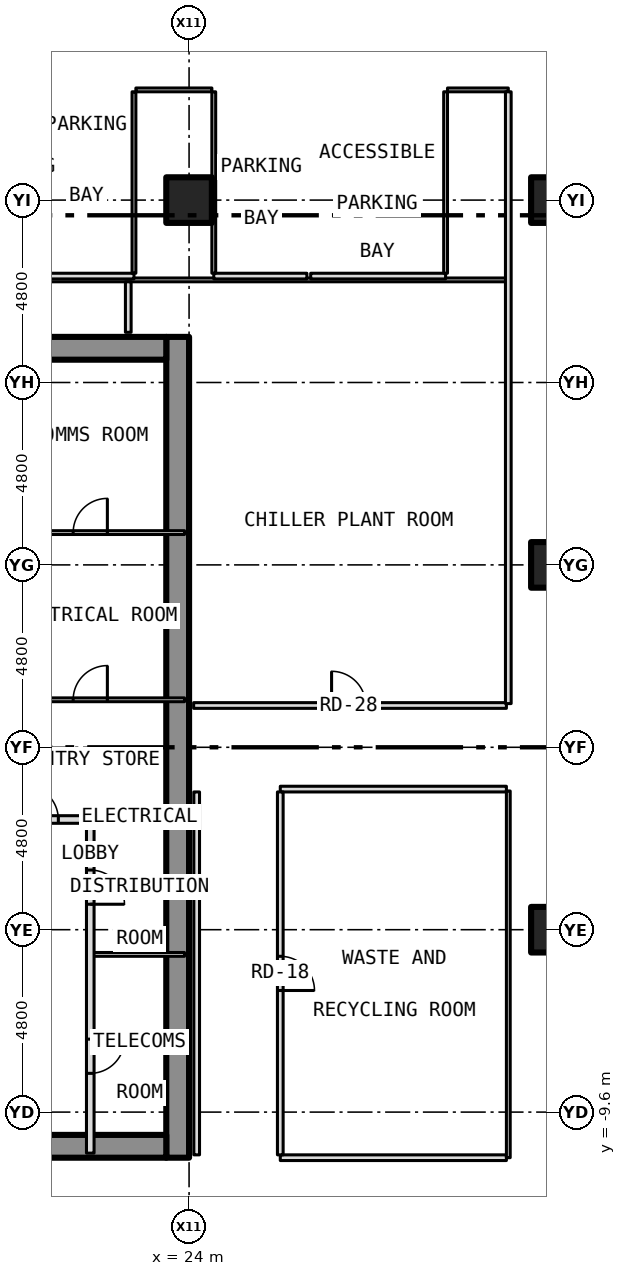
"""IFC4 building model, lengths in metres.
Left out: names, types, materials, properties, quantities, classifications, styles, units other than length and angle.
Written with IfcOpenShell. Run it as: python <this file> out.ifc"""

import sys

from ifc_helpers import new_model, si_unit, direction, frame, frame_2d, origin, origin_2d, place, context, subcontext, project, spatial, rectangle, hollow_rectangle, extrude, element, fill, save


model = new_model("IFC4")
c1 = context("Model", 3, precision=1e-05, world=origin(), true_north=direction((0.0, 1.0)))
c2 = subcontext(c1, "Body", "Model", "MODEL_VIEW")
j1 = project(units=[si_unit("LENGTHUNIT", "METRE"), si_unit("PLANEANGLEUNIT", "RADIAN")], contexts=[c1])
p1 = place(None, origin())
s1 = spatial("IfcSite", under=j1, at=p1, CompositionType="ELEMENT")
p2 = place(p1, origin())
s2 = spatial("IfcBuilding", under=s1, at=p2, CompositionType="ELEMENT")
p3 = place(p2, frame((0.0, 0.0, -10.0)))
s3 = spatial("IfcBuildingStorey", under=s2, at=p3, CompositionType="ELEMENT", Elevation=-10.0)
for number, where, z_axis, x_axis in (
    (1, (33.6, -4.8, -0.6), (0.0, 0.0, 1.0), (1.0, 0.0, 0.0)),
    (2, (33.6, 4.8, -0.6), (0.0, 0.0, 1.0), (1.0, 0.0, 0.0)),
    (3, (33.6, 14.4, -0.6), (0.0, 0.0, 1.0), (1.0, 0.0, 0.0)),
    (4, (24.0, 14.4, -0.6), (0.0, 0.0, 1.0), (1.0, 0.0, 0.0)),
):
    element("IfcColumn", number, at=place(p3, frame(where, z_axis=z_axis, x_axis=x_axis)), inside=s3, PredefinedType="COLUMN", context=c2, shape_type="SweptSolid", body=[
        extrude(hollow_rectangle(XDim=1.2, YDim=1.2, WallThickness=0.07, at=origin_2d()), origin(), (0.0, 0.0, 1.0), 5.3),
    ])
p4 = place(p3, frame((23.7, -10.8, 0.0), z_axis=(0.0, 0.0, 1.0), x_axis=(0.0, 1.0, 0.0)))
e5 = element("IfcWall", 5, at=p4, inside=s3, PredefinedType="SHEAR", context=c2, shape_type="SweptSolid", body=[
    extrude(rectangle(XDim=21.6, YDim=0.6, at=frame_2d((10.8, 0.0))), origin(), (0.0, 0.0, 1.0), 4.7),
])
for number, where, z_axis, x_axis in (
    (6, (16.4, 10.5, 0.0), (0.0, 0.0, 1.0), (1.0, 0.0, 0.0)),
    (7, (16.4, -10.5, 0.0), (0.0, 0.0, 1.0), (1.0, 0.0, 0.0)),
):
    element("IfcWall", number, at=place(p3, frame(where, z_axis=z_axis, x_axis=x_axis)), inside=s3, PredefinedType="SHEAR", context=c2, shape_type="SweptSolid", body=[
        extrude(rectangle(XDim=7.0, YDim=0.6, at=frame_2d((3.5, 0.0))), origin(), (0.0, 0.0, 1.0), 4.7),
    ])
p5 = place(p3, frame((26.4, -10.8, 0.0), z_axis=(0.0, 0.0, 1.0), x_axis=(1.0, 0.0, 0.0)))
e8 = element("IfcWall", 8, at=p5, inside=s3, PredefinedType="PARTITIONING", context=c2, shape_type="SweptSolid", body=[
    extrude(rectangle(XDim=5.95, YDim=0.15, at=frame_2d((2.975, 0.0))), origin(), (0.0, 0.0, 1.0), 4.7),
])
p6 = place(p3, frame((21.4, -5.45, 0.0), z_axis=(0.0, 0.0, 1.0), x_axis=(1.0, 0.0, 0.0)))
e9 = element("IfcWall", 9, at=p6, inside=s3, PredefinedType="PARTITIONING", context=c2, shape_type="SweptSolid", body=[
    extrude(rectangle(XDim=2.48, YDim=0.1, at=frame_2d((1.24, 0.0))), origin(), (0.0, 0.0, 1.0), 4.7),
])
p7 = place(p3, frame((15.92, -1.9, 0.0), z_axis=(0.0, 0.0, 1.0), x_axis=(1.0, 0.0, 0.0)))
e10 = element("IfcWall", 10, at=p7, inside=s3, PredefinedType="PARTITIONING", context=c2, shape_type="SweptSolid", body=[
    extrude(rectangle(XDim=7.96, YDim=0.2, at=frame_2d((3.98, 0.0))), origin(), (0.0, 0.0, 1.0), 4.7),
])
p8 = place(p7, frame((3.74, 0.0, 0.0)))
e11 = element("IfcOpeningElement", 11, at=p8, cuts=e10, PredefinedType="OPENING", context=c2, shape_type="SweptSolid", body=[
    extrude(rectangle(XDim=0.9, YDim=2.1, at=frame_2d((0.45, 1.05))), frame((0.0, 0.112, 0.0), z_axis=(0.0, -1.0, 0.0), x_axis=(1.0, 0.0, 0.0)), (0.0, 0.0, 1.0), 0.224),
])
p9 = place(p3, frame((26.4, -1.1, 0.0), z_axis=(0.0, 0.0, 1.0), x_axis=(1.0, 0.0, 0.0)))
e12 = element("IfcWall", 12, at=p9, inside=s3, PredefinedType="PARTITIONING", context=c2, shape_type="SweptSolid", body=[
    extrude(rectangle(XDim=5.95, YDim=0.15, at=frame_2d((2.975, 0.0))), origin(), (0.0, 0.0, 1.0), 4.7),
])
p10 = place(p3, frame((24.12, 1.1, 0.0), z_axis=(0.0, 0.0, 1.0), x_axis=(1.0, 0.0, 0.0)))
e13 = element("IfcWall", 13, at=p10, inside=s3, PredefinedType="PARTITIONING", context=c2, shape_type="SweptSolid", body=[
    extrude(rectangle(XDim=8.23, YDim=0.15, at=frame_2d((4.115, 0.0))), origin(), (0.0, 0.0, 1.0), 4.7),
])
p11 = place(p10, frame((3.63, 0.0, 0.0)))
e14 = element("IfcOpeningElement", 14, at=p11, cuts=e13, PredefinedType="OPENING", context=c2, shape_type="SweptSolid", body=[
    extrude(rectangle(XDim=0.9, YDim=2.1, at=frame_2d((0.45, 1.05))), frame((0.0, 0.087, 0.0), z_axis=(0.0, -1.0, 0.0), x_axis=(1.0, 0.0, 0.0)), (0.0, 0.0, 1.0), 0.174),
])
p12 = place(p3, frame((18.8, 1.25, 0.0), z_axis=(0.0, 0.0, 1.0), x_axis=(1.0, 0.0, 0.0)))
e15 = element("IfcWall", 15, at=p12, inside=s3, PredefinedType="PARTITIONING", context=c2, shape_type="SweptSolid", body=[
    extrude(rectangle(XDim=5.08, YDim=0.1, at=frame_2d((2.54, 0.0))), origin(), (0.0, 0.0, 1.0), 4.7),
])
p13 = place(p12, frame((2.15, 0.0, 0.0)))
e16 = element("IfcOpeningElement", 16, at=p13, cuts=e15, PredefinedType="OPENING", context=c2, shape_type="SweptSolid", body=[
    extrude(rectangle(XDim=0.9, YDim=2.1, at=frame_2d((0.45, 1.05))), frame((0.0, 0.062, 0.0), z_axis=(0.0, -1.0, 0.0), x_axis=(1.0, 0.0, 0.0)), (0.0, 0.0, 1.0), 0.124),
])
p14 = place(p3, frame((18.8, 5.65, 0.0), z_axis=(0.0, 0.0, 1.0), x_axis=(1.0, 0.0, 0.0)))
e17 = element("IfcWall", 17, at=p14, inside=s3, PredefinedType="PARTITIONING", context=c2, shape_type="SweptSolid", body=[
    extrude(rectangle(XDim=5.08, YDim=0.1, at=frame_2d((2.54, 0.0))), origin(), (0.0, 0.0, 1.0), 4.7),
])
p15 = place(p14, frame((2.15, 0.0, 0.0)))
e18 = element("IfcOpeningElement", 18, at=p15, cuts=e17, PredefinedType="OPENING", context=c2, shape_type="SweptSolid", body=[
    extrude(rectangle(XDim=0.9, YDim=2.1, at=frame_2d((0.45, 1.05))), frame((0.0, 0.062, 0.0), z_axis=(0.0, -1.0, 0.0), x_axis=(1.0, 0.0, 0.0)), (0.0, 0.0, 1.0), 0.124),
])
p16 = place(p3, frame((-37.6, 12.3, 0.0), z_axis=(0.0, 0.0, 1.0), x_axis=(1.0, 0.0, 0.0)))
e19 = element("IfcWall", 19, at=p16, inside=s3, PredefinedType="PARTITIONING", context=c2, shape_type="SweptSolid", body=[
    extrude(rectangle(XDim=70.0, YDim=0.1, at=frame_2d((35.0, 0.0))), origin(), (0.0, 0.0, 1.0), 4.7),
])
p17 = place(p3, frame((20.1, 12.4, 0.0), z_axis=(0.0, 0.0, 1.0), x_axis=(1.0, 0.0, 0.0)))
e20 = element("IfcWall", 20, at=p17, inside=s3, PredefinedType="PARTITIONING", context=c2, shape_type="SweptSolid", body=[
    extrude(rectangle(XDim=2.45, YDim=0.15, at=frame_2d((1.225, 0.0))), origin(), (0.0, 0.0, 1.0), 4.7),
])
p18 = place(p3, frame((24.65, 12.4, 0.0), z_axis=(0.0, 0.0, 1.0), x_axis=(1.0, 0.0, 0.0)))
e21 = element("IfcWall", 21, at=p18, inside=s3, PredefinedType="PARTITIONING", context=c2, shape_type="SweptSolid", body=[
    extrude(rectangle(XDim=2.45, YDim=0.15, at=frame_2d((1.225, 0.0))), origin(), (0.0, 0.0, 1.0), 4.7),
])
p19 = place(p3, frame((27.2, 12.4, 0.0), z_axis=(0.0, 0.0, 1.0), x_axis=(1.0, 0.0, 0.0)))
e22 = element("IfcWall", 22, at=p19, inside=s3, PredefinedType="PARTITIONING", context=c2, shape_type="SweptSolid", body=[
    extrude(rectangle(XDim=3.55, YDim=0.15, at=frame_2d((1.775, 0.0))), origin(), (0.0, 0.0, 1.0), 4.7),
])
p20 = place(p3, frame((22.6, 17.3, 0.0), z_axis=(0.0, 0.0, 1.0), x_axis=(1.0, 0.0, 0.0)))
e23 = element("IfcWall", 23, at=p20, inside=s3, PredefinedType="PARTITIONING", context=c2, shape_type="SweptSolid", body=[
    extrude(rectangle(XDim=2.0, YDim=0.1, at=frame_2d((1.0, 0.0))), origin(), (0.0, 0.0, 1.0), 4.7),
])
p21 = place(p3, frame((30.8, 17.3, 0.0), z_axis=(0.0, 0.0, 1.0), x_axis=(1.0, 0.0, 0.0)))
e24 = element("IfcWall", 24, at=p21, inside=s3, PredefinedType="PARTITIONING", context=c2, shape_type="SweptSolid", body=[
    extrude(rectangle(XDim=1.6, YDim=0.1, at=frame_2d((0.8, 0.0))), origin(), (0.0, 0.0, 1.0), 4.7),
])
p22 = place(p3, frame((21.4, -10.68, 0.0), z_axis=(0.0, 0.0, 1.0), x_axis=(0.0, 1.0, 0.0)))
e25 = element("IfcWall", 25, at=p22, inside=s3, PredefinedType="PARTITIONING", context=c2, shape_type="SweptSolid", body=[
    extrude(rectangle(XDim=8.68, YDim=0.2, at=frame_2d((4.34, 0.0))), origin(), (0.0, 0.0, 1.0), 4.7),
])
p23 = place(p22, frame((2.1, 0.0, 0.0)))
e26 = element("IfcOpeningElement", 26, at=p23, cuts=e25, PredefinedType="OPENING", context=c2, shape_type="SweptSolid", body=[
    extrude(rectangle(XDim=0.9, YDim=2.1, at=frame_2d((0.45, 1.05))), frame((0.0, 0.112, 0.0), z_axis=(0.0, -1.0, 0.0), x_axis=(1.0, 0.0, 0.0)), (0.0, 0.0, 1.0), 0.224),
])
p24 = place(p22, frame((6.55, 0.0, 0.0)))
e27 = element("IfcOpeningElement", 27, at=p24, cuts=e25, PredefinedType="OPENING", context=c2, shape_type="SweptSolid", body=[
    extrude(rectangle(XDim=0.9, YDim=2.1, at=frame_2d((0.45, 1.05))), frame((0.0, 0.112, 0.0), z_axis=(0.0, -1.0, 0.0), x_axis=(1.0, 0.0, 0.0)), (0.0, 0.0, 1.0), 0.224),
])
p25 = place(p3, frame((22.4, 10.92, 0.0), z_axis=(0.0, 0.0, 1.0), x_axis=(0.0, 1.0, 0.0)))
e28 = element("IfcWall", 28, at=p25, inside=s3, PredefinedType="PARTITIONING", context=c2, shape_type="SweptSolid", body=[
    extrude(rectangle(XDim=1.33, YDim=0.15, at=frame_2d((0.665, 0.0))), origin(), (0.0, 0.0, 1.0), 4.7),
])
p26 = place(p3, frame((22.55, 12.475, 0.0), z_axis=(0.0, 0.0, 1.0), x_axis=(0.0, 1.0, 0.0)))
e29 = element("IfcWall", 29, at=p26, inside=s3, PredefinedType="PARTITIONING", context=c2, shape_type="SweptSolid", body=[
    extrude(rectangle(XDim=4.775, YDim=0.1, at=frame_2d((2.387, 0.0))), origin(), (0.0, 0.0, 1.0), 4.7),
])
p27 = place(p3, frame((24.2, -10.725, 0.0), z_axis=(0.0, 0.0, 1.0), x_axis=(0.0, 1.0, 0.0)))
e30 = element("IfcWall", 30, at=p27, inside=s3, PredefinedType="PARTITIONING", context=c2, shape_type="SweptSolid", body=[
    extrude(rectangle(XDim=9.55, YDim=0.15, at=frame_2d((4.775, 0.0))), origin(), (0.0, 0.0, 1.0), 4.7),
])
p28 = place(p3, frame((24.65, 12.475, 0.0), z_axis=(0.0, 0.0, 1.0), x_axis=(0.0, 1.0, 0.0)))
e31 = element("IfcWall", 31, at=p28, inside=s3, PredefinedType="PARTITIONING", context=c2, shape_type="SweptSolid", body=[
    extrude(rectangle(XDim=4.775, YDim=0.1, at=frame_2d((2.387, 0.0))), origin(), (0.0, 0.0, 1.0), 4.7),
])
p29 = place(p3, frame((26.4, -10.725, 0.0), z_axis=(0.0, 0.0, 1.0), x_axis=(0.0, 1.0, 0.0)))
e32 = element("IfcWall", 32, at=p29, inside=s3, PredefinedType="PARTITIONING", context=c2, shape_type="SweptSolid", body=[
    extrude(rectangle(XDim=9.55, YDim=0.15, at=frame_2d((4.775, 0.0))), origin(), (0.0, 0.0, 1.0), 4.7),
])
p30 = place(p29, frame((4.325, 0.0, 0.0)))
e33 = element("IfcOpeningElement", 33, at=p30, cuts=e32, PredefinedType="OPENING", context=c2, shape_type="SweptSolid", body=[
    extrude(rectangle(XDim=0.9, YDim=2.1, at=frame_2d((0.45, 1.05))), frame((0.0, 0.087, 0.0), z_axis=(0.0, -1.0, 0.0), x_axis=(1.0, 0.0, 0.0)), (0.0, 0.0, 1.0), 0.174),
])
p31 = place(p3, frame((30.75, 12.475, 0.0), z_axis=(0.0, 0.0, 1.0), x_axis=(0.0, 1.0, 0.0)))
e34 = element("IfcWall", 34, at=p31, inside=s3, PredefinedType="PARTITIONING", context=c2, shape_type="SweptSolid", body=[
    extrude(rectangle(XDim=4.775, YDim=0.1, at=frame_2d((2.387, 0.0))), origin(), (0.0, 0.0, 1.0), 4.7),
])
p32 = place(p3, frame((32.4, -10.8, 0.0), z_axis=(0.0, 0.0, 1.0), x_axis=(0.0, 1.0, 0.0)))
e35 = element("IfcWall", 35, at=p32, inside=s3, PredefinedType="PARTITIONING", context=c2, shape_type="SweptSolid", body=[
    extrude(rectangle(XDim=9.65, YDim=0.1, at=frame_2d((4.825, 0.0))), origin(), (0.0, 0.0, 1.0), 4.7),
])
p33 = place(p3, frame((32.4, 1.15, 0.0), z_axis=(0.0, 0.0, 1.0), x_axis=(0.0, 1.0, 0.0)))
e36 = element("IfcWall", 36, at=p33, inside=s3, PredefinedType="PARTITIONING", context=c2, shape_type="SweptSolid", body=[
    extrude(rectangle(XDim=16.1, YDim=0.15, at=frame_2d((8.05, 0.0))), origin(), (0.0, 0.0, 1.0), 4.7),
])
p34 = place(p23, origin())
e37 = element("IfcDoor", 37, at=p34, inside=s3, OperationType="SINGLE_SWING_RIGHT", PredefinedType="DOOR", context=c2, shape_type="SweptSolid", body=[
    extrude(rectangle(XDim=0.9, YDim=2.1, at=frame_2d((0.45, 1.05))), frame((0.0, 0.025, 0.0), z_axis=(0.0, -1.0, 0.0), x_axis=(1.0, 0.0, 0.0)), (0.0, 0.0, 1.0), 0.05),
])
fill(e26, e37)
p35 = place(p24, origin())
e38 = element("IfcDoor", 38, at=p35, inside=s3, OperationType="SINGLE_SWING_LEFT", PredefinedType="DOOR", context=c2, shape_type="SweptSolid", body=[
    extrude(rectangle(XDim=0.9, YDim=2.1, at=frame_2d((0.45, 1.05))), frame((0.0, 0.025, 0.0), z_axis=(0.0, -1.0, 0.0), x_axis=(1.0, 0.0, 0.0)), (0.0, 0.0, 1.0), 0.05),
])
fill(e27, e38)
p36 = place(p8, origin())
e39 = element("IfcDoor", 39, at=p36, inside=s3, OperationType="SINGLE_SWING_LEFT", PredefinedType="DOOR", context=c2, shape_type="SweptSolid", body=[
    extrude(rectangle(XDim=0.9, YDim=2.1, at=frame_2d((0.45, 1.05))), frame((0.0, 0.025, 0.0), z_axis=(0.0, -1.0, 0.0), x_axis=(1.0, 0.0, 0.0)), (0.0, 0.0, 1.0), 0.05),
])
fill(e11, e39)
p37 = place(p13, origin())
e40 = element("IfcDoor", 40, at=p37, inside=s3, OperationType="SINGLE_SWING_RIGHT", PredefinedType="DOOR", context=c2, shape_type="SweptSolid", body=[
    extrude(rectangle(XDim=0.9, YDim=2.1, at=frame_2d((0.45, 1.05))), frame((0.0, 0.025, 0.0), z_axis=(0.0, -1.0, 0.0), x_axis=(1.0, 0.0, 0.0)), (0.0, 0.0, 1.0), 0.05),
])
fill(e16, e40)
p38 = place(p15, origin())
e41 = element("IfcDoor", 41, at=p38, inside=s3, OperationType="SINGLE_SWING_RIGHT", PredefinedType="DOOR", context=c2, shape_type="SweptSolid", body=[
    extrude(rectangle(XDim=0.9, YDim=2.1, at=frame_2d((0.45, 1.05))), frame((0.0, 0.025, 0.0), z_axis=(0.0, -1.0, 0.0), x_axis=(1.0, 0.0, 0.0)), (0.0, 0.0, 1.0), 0.05),
])
fill(e18, e41)
p39 = place(p30, origin())
e42 = element("IfcDoor", 42, at=p39, inside=s3, OperationType="SINGLE_SWING_LEFT", PredefinedType="DOOR", context=c2, shape_type="SweptSolid", body=[
    extrude(rectangle(XDim=0.9, YDim=2.1, at=frame_2d((0.45, 1.05))), frame((0.0, 0.025, 0.0), z_axis=(0.0, -1.0, 0.0), x_axis=(1.0, 0.0, 0.0)), (0.0, 0.0, 1.0), 0.05),
])
fill(e33, e42)
p40 = place(p11, origin())
e43 = element("IfcDoor", 43, at=p40, inside=s3, OperationType="SINGLE_SWING_LEFT", PredefinedType="DOOR", context=c2, shape_type="SweptSolid", body=[
    extrude(rectangle(XDim=0.9, YDim=2.1, at=frame_2d((0.45, 1.05))), frame((0.0, 0.025, 0.0), z_axis=(0.0, -1.0, 0.0), x_axis=(1.0, 0.0, 0.0)), (0.0, 0.0, 1.0), 0.05),
])
fill(e14, e43)
save(model, sys.argv[1])
